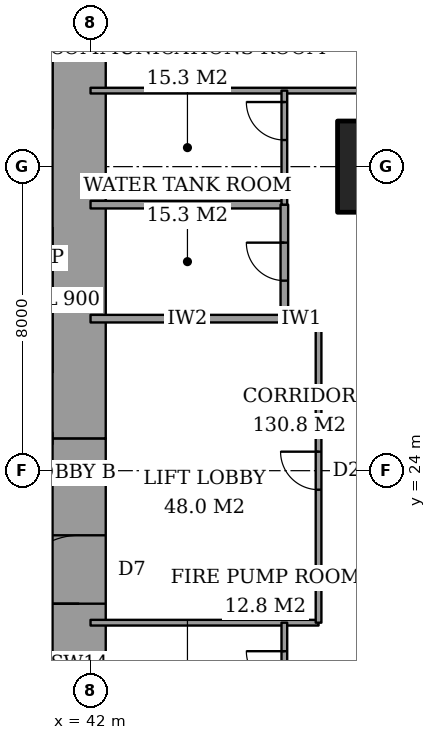
"""IFC4 building model, lengths in metres.
Left out: names, types, materials, properties, quantities, classifications, styles, units other than length and angle.
Written with IfcOpenShell. Run it as: python <this file> out.ifc"""

import sys

from ifc_helpers import new_model, si_unit, direction, frame, frame_2d, origin, origin_2d, place, context, subcontext, project, spatial, rectangle, extrude, element, fill, save


model = new_model("IFC4")
c1 = context("Model", 3, precision=1e-05, world=origin(), true_north=direction((0.0, 1.0)))
c2 = subcontext(c1, "Body", "Model", "MODEL_VIEW")
j1 = project(units=[si_unit("LENGTHUNIT", "METRE"), si_unit("PLANEANGLEUNIT", "RADIAN")], contexts=[c1])
p1 = place(None, origin())
s1 = spatial("IfcSite", under=j1, at=p1, CompositionType="ELEMENT")
p2 = place(p1, origin())
s2 = spatial("IfcBuilding", under=s1, at=p2, CompositionType="ELEMENT")
p3 = place(p2, frame((0.0, 0.0, 277.2)))
s3 = spatial("IfcBuildingStorey", under=s2, at=p3, CompositionType="ELEMENT", Elevation=277.2)
p4 = place(p3, frame((50.0, 32.0, 0.0), z_axis=(0.0, 0.0, 1.0), x_axis=(1.0, 0.0, 0.0)))
e1 = element("IfcColumn", 1, at=p4, inside=s3, PredefinedType="COLUMN", context=c2, shape_type="SweptSolid", body=[
    extrude(rectangle(XDim=3.0, YDim=2.4, at=origin_2d()), origin(), (0.0, 0.0, 1.0), 5.4),
])
p5 = place(p3, frame((41.7, 13.0, 0.0), z_axis=(0.0, 0.0, 1.0), x_axis=(0.0, 1.0, 0.0)))
e2 = element("IfcWall", 2, at=p5, inside=s3, PredefinedType="SHEAR", context=c2, shape_type="SweptSolid", body=[
    extrude(rectangle(XDim=11.85, YDim=1.4, at=frame_2d((5.925, 0.0))), origin(), (0.0, 0.0, 1.0), 5.4),
])
p6 = place(p5, frame((7.5, 0.0, 0.0)))
e3 = element("IfcOpeningElement", 3, at=p6, cuts=e2, PredefinedType="OPENING", context=c2, shape_type="SweptSolid", body=[
    extrude(rectangle(XDim=1.8, YDim=2.4, at=frame_2d((0.9, 1.2))), frame((0.0, 0.71, 0.0), z_axis=(0.0, -1.0, 0.0), x_axis=(1.0, 0.0, 0.0)), (0.0, 0.0, 1.0), 1.42),
])
p7 = place(p3, frame((41.7, 24.85, 0.0), z_axis=(0.0, 0.0, 1.0), x_axis=(0.0, 1.0, 0.0)))
e4 = element("IfcWall", 4, at=p7, inside=s3, PredefinedType="SHEAR", context=c2, shape_type="SweptSolid", body=[
    extrude(rectangle(XDim=10.15, YDim=1.4, at=frame_2d((5.075, 0.0))), origin(), (0.0, 0.0, 1.0), 5.4),
])
p8 = place(p3, frame((42.0, 20.0, 0.0), z_axis=(0.0, 0.0, 1.0), x_axis=(1.0, 0.0, 0.0)))
e5 = element("IfcWall", 5, at=p8, inside=s3, PredefinedType="PARTITIONING", context=c2, shape_type="SweptSolid", body=[
    extrude(rectangle(XDim=6.0, YDim=0.15, at=frame_2d((3.0, 0.0))), origin(), (0.0, 0.0, 1.0), 5.15),
])
p9 = place(p3, frame((42.0, 28.0, 0.0), z_axis=(0.0, 0.0, 1.0), x_axis=(1.0, 0.0, 0.0)))
e6 = element("IfcWall", 6, at=p9, inside=s3, PredefinedType="PARTITIONING", context=c2, shape_type="SweptSolid", body=[
    extrude(rectangle(XDim=5.1, YDim=0.2, at=frame_2d((2.55, 0.0))), origin(), (0.0, 0.0, 1.0), 5.15),
])
p10 = place(p3, frame((47.1, 28.0, 0.0), z_axis=(0.0, 0.0, 1.0), x_axis=(1.0, 0.0, 0.0)))
e7 = element("IfcWall", 7, at=p10, inside=s3, PredefinedType="PARTITIONING", context=c2, shape_type="SweptSolid", body=[
    extrude(rectangle(XDim=0.9, YDim=0.15, at=frame_2d((0.45, 0.0))), origin(), (0.0, 0.0, 1.0), 5.15),
])
p11 = place(p3, frame((42.0, 31.0, 0.0), z_axis=(0.0, 0.0, 1.0), x_axis=(1.0, 0.0, 0.0)))
e8 = element("IfcWall", 8, at=p11, inside=s3, PredefinedType="PARTITIONING", context=c2, shape_type="SweptSolid", body=[
    extrude(rectangle(XDim=5.1, YDim=0.2, at=frame_2d((2.55, 0.0))), origin(), (0.0, 0.0, 1.0), 5.15),
])
p12 = place(p3, frame((42.0, 34.0, 0.0), z_axis=(0.0, 0.0, 1.0), x_axis=(1.0, 0.0, 0.0)))
e9 = element("IfcWall", 9, at=p12, inside=s3, PredefinedType="PARTITIONING", context=c2, shape_type="SweptSolid", body=[
    extrude(rectangle(XDim=12.0, YDim=0.15, at=frame_2d((6.0, 0.0))), origin(), (0.0, 0.0, 1.0), 5.15),
])
p13 = place(p12, frame((9.35, 0.0, 0.0)))
e10 = element("IfcOpeningElement", 10, at=p13, cuts=e9, PredefinedType="OPENING", context=c2, shape_type="SweptSolid", body=[
    extrude(rectangle(XDim=1.0, YDim=2.1, at=frame_2d((0.5, 1.05))), frame((0.0, 0.085, 0.0), z_axis=(0.0, -1.0, 0.0), x_axis=(1.0, 0.0, 0.0)), (0.0, 0.0, 1.0), 0.17),
])
p14 = place(p3, frame((47.1, 28.0, 0.0), z_axis=(0.0, 0.0, 1.0), x_axis=(0.0, 1.0, 0.0)))
e11 = element("IfcWall", 11, at=p14, inside=s3, PredefinedType="PARTITIONING", context=c2, shape_type="SweptSolid", body=[
    extrude(rectangle(XDim=3.0, YDim=0.2, at=frame_2d((1.5, 0.0))), origin(), (0.0, 0.0, 1.0), 5.15),
])
p15 = place(p14, frame((1.0, 0.0, 0.0)))
e12 = element("IfcOpeningElement", 12, at=p15, cuts=e11, PredefinedType="OPENING", context=c2, shape_type="SweptSolid", body=[
    extrude(rectangle(XDim=1.0, YDim=2.1, at=frame_2d((0.5, 1.05))), frame((0.0, 0.11, 0.0), z_axis=(0.0, -1.0, 0.0), x_axis=(1.0, 0.0, 0.0)), (0.0, 0.0, 1.0), 0.22),
])
p16 = place(p3, frame((47.1, 14.0, 0.0), z_axis=(0.0, 0.0, 1.0), x_axis=(0.0, 1.0, 0.0)))
e13 = element("IfcWall", 13, at=p16, inside=s3, PredefinedType="PARTITIONING", context=c2, shape_type="SweptSolid", body=[
    extrude(rectangle(XDim=6.0, YDim=0.15, at=frame_2d((3.0, 0.0))), origin(), (0.0, 0.0, 1.0), 5.15),
])
p17 = place(p16, frame((0.35, 0.0, 0.0)))
e14 = element("IfcOpeningElement", 14, at=p17, cuts=e13, PredefinedType="OPENING", context=c2, shape_type="SweptSolid", body=[
    extrude(rectangle(XDim=1.0, YDim=2.1, at=frame_2d((0.5, 1.05))), frame((0.0, 0.085, 0.0), z_axis=(0.0, -1.0, 0.0), x_axis=(1.0, 0.0, 0.0)), (0.0, 0.0, 1.0), 0.17),
])
p18 = place(p16, frame((4.25, 0.0, 0.0)))
e15 = element("IfcOpeningElement", 15, at=p18, cuts=e13, PredefinedType="OPENING", context=c2, shape_type="SweptSolid", body=[
    extrude(rectangle(XDim=1.0, YDim=2.1, at=frame_2d((0.5, 1.05))), frame((0.0, 0.085, 0.0), z_axis=(0.0, -1.0, 0.0), x_axis=(1.0, 0.0, 0.0)), (0.0, 0.0, 1.0), 0.17),
])
p19 = place(p3, frame((47.1, 31.0, 0.0), z_axis=(0.0, 0.0, 1.0), x_axis=(0.0, 1.0, 0.0)))
e16 = element("IfcWall", 16, at=p19, inside=s3, PredefinedType="PARTITIONING", context=c2, shape_type="SweptSolid", body=[
    extrude(rectangle(XDim=3.0, YDim=0.15, at=frame_2d((1.5, 0.0))), origin(), (0.0, 0.0, 1.0), 5.15),
])
p20 = place(p19, frame((1.7, 0.0, 0.0)))
e17 = element("IfcOpeningElement", 17, at=p20, cuts=e16, PredefinedType="OPENING", context=c2, shape_type="SweptSolid", body=[
    extrude(rectangle(XDim=1.0, YDim=2.1, at=frame_2d((0.5, 1.05))), frame((0.0, 0.085, 0.0), z_axis=(0.0, -1.0, 0.0), x_axis=(1.0, 0.0, 0.0)), (0.0, 0.0, 1.0), 0.17),
])
p21 = place(p3, frame((48.0, 20.0, 0.0), z_axis=(0.0, 0.0, 1.0), x_axis=(0.0, 1.0, 0.0)))
e18 = element("IfcWall", 18, at=p21, inside=s3, PredefinedType="PARTITIONING", context=c2, shape_type="SweptSolid", body=[
    extrude(rectangle(XDim=8.0, YDim=0.15, at=frame_2d((4.0, 0.0))), origin(), (0.0, 0.0, 1.0), 5.15),
])
p22 = place(p21, frame((3.5, 0.0, 0.0)))
e19 = element("IfcOpeningElement", 19, at=p22, cuts=e18, PredefinedType="OPENING", context=c2, shape_type="SweptSolid", body=[
    extrude(rectangle(XDim=1.0, YDim=2.1, at=frame_2d((0.5, 1.05))), frame((0.0, 0.085, 0.0), z_axis=(0.0, -1.0, 0.0), x_axis=(1.0, 0.0, 0.0)), (0.0, 0.0, 1.0), 0.17),
])
p23 = place(p22, origin())
e20 = element("IfcDoor", 20, at=p23, inside=s3, OperationType="SINGLE_SWING_LEFT", PredefinedType="DOOR", context=c2, shape_type="SweptSolid", body=[
    extrude(rectangle(XDim=1.0, YDim=2.1, at=frame_2d((0.5, 1.05))), frame((0.0, 0.025, 0.0), z_axis=(0.0, -1.0, 0.0), x_axis=(1.0, 0.0, 0.0)), (0.0, 0.0, 1.0), 0.05),
])
fill(e19, e20)
p24 = place(p18, origin())
e21 = element("IfcDoor", 21, at=p24, inside=s3, OperationType="SINGLE_SWING_LEFT", PredefinedType="DOOR", context=c2, shape_type="SweptSolid", body=[
    extrude(rectangle(XDim=1.0, YDim=2.1, at=frame_2d((0.5, 1.05))), frame((0.0, 0.025, 0.0), z_axis=(0.0, -1.0, 0.0), x_axis=(1.0, 0.0, 0.0)), (0.0, 0.0, 1.0), 0.05),
])
fill(e15, e21)
p25 = place(p15, origin())
e22 = element("IfcDoor", 22, at=p25, inside=s3, OperationType="SINGLE_SWING_LEFT", PredefinedType="DOOR", context=c2, shape_type="SweptSolid", body=[
    extrude(rectangle(XDim=1.0, YDim=2.1, at=frame_2d((0.5, 1.05))), frame((0.0, 0.025, 0.0), z_axis=(0.0, -1.0, 0.0), x_axis=(1.0, 0.0, 0.0)), (0.0, 0.0, 1.0), 0.05),
])
fill(e12, e22)
p26 = place(p20, origin())
e23 = element("IfcDoor", 23, at=p26, inside=s3, OperationType="SINGLE_SWING_LEFT", PredefinedType="DOOR", context=c2, shape_type="SweptSolid", body=[
    extrude(rectangle(XDim=1.0, YDim=2.1, at=frame_2d((0.5, 1.05))), frame((0.0, 0.025, 0.0), z_axis=(0.0, -1.0, 0.0), x_axis=(1.0, 0.0, 0.0)), (0.0, 0.0, 1.0), 0.05),
])
fill(e17, e23)
p27 = place(p6, origin())
e24 = element("IfcDoor", 24, at=p27, inside=s3, OperationType="DOUBLE_DOOR_DOUBLE_SWING", PredefinedType="DOOR", context=c2, shape_type="SweptSolid", body=[
    extrude(rectangle(XDim=1.8, YDim=2.4, at=frame_2d((0.9, 1.2))), frame((0.0, 0.025, 0.0), z_axis=(0.0, -1.0, 0.0), x_axis=(1.0, 0.0, 0.0)), (0.0, 0.0, 1.0), 0.05),
])
fill(e3, e24)
save(model, sys.argv[1])
